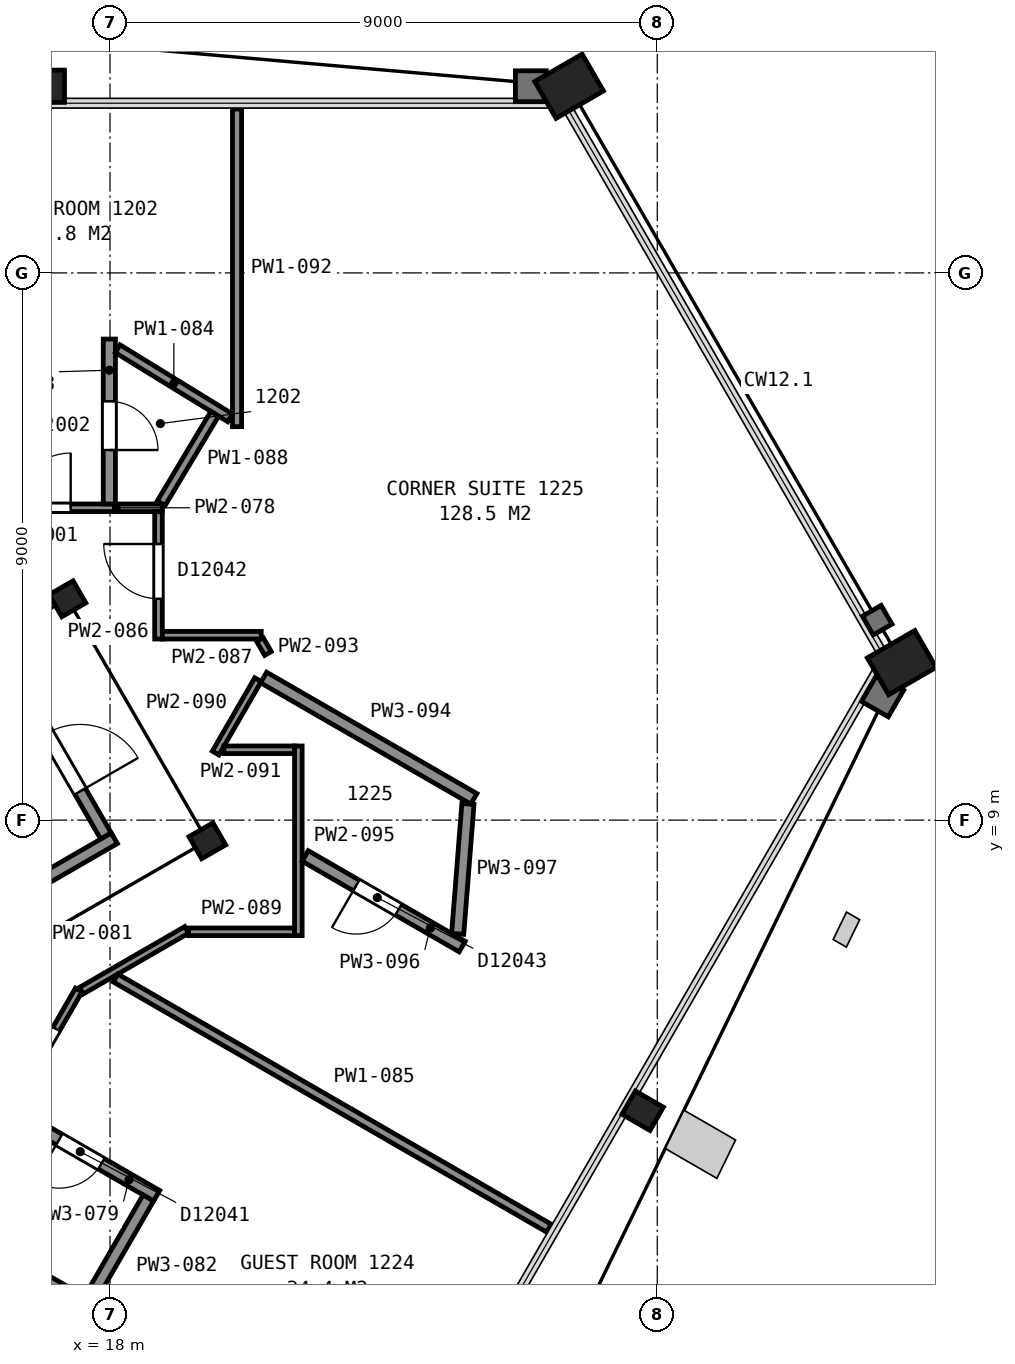
"""IFC4 building model, lengths in metres.
Left out: names, types, materials, properties, quantities, classifications, styles, units other than length and angle.
Written with IfcOpenShell. Run it as: python <this file> out.ifc"""

import sys

from ifc_helpers import new_model, si_unit, direction, frame, frame_2d, origin, origin_2d, place, context, subcontext, project, spatial, rectangle, hollow_rectangle, i_section, extrude, element, fill, save


model = new_model("IFC4")
c1 = context("Model", 3, precision=1e-05, world=origin(), true_north=direction((0.0, 1.0)))
c2 = subcontext(c1, "Body", "Model", "MODEL_VIEW")
j1 = project(units=[si_unit("LENGTHUNIT", "METRE"), si_unit("PLANEANGLEUNIT", "RADIAN")], contexts=[c1])
p1 = place(None, origin())
s1 = spatial("IfcSite", under=j1, at=p1, CompositionType="ELEMENT")
p2 = place(p1, origin())
s2 = spatial("IfcBuilding", under=s1, at=p2, CompositionType="ELEMENT")
p3 = place(p2, frame((0.0, 0.0, 58.4)))
s3 = spatial("IfcBuildingStorey", under=s2, at=p3, CompositionType="ELEMENT", Elevation=58.4)
p4 = place(p3, frame((25.55, 21.07, 0.0), z_axis=(0.0, 0.0, 1.0), x_axis=(0.5, -0.866025403784, 0.0)))
e1 = element("IfcColumn", 1, at=p4, inside=s3, PredefinedType="COLUMN", context=c2, shape_type="SweptSolid", body=[
    extrude(hollow_rectangle(XDim=0.7, YDim=0.9, WallThickness=0.065, at=origin_2d()), origin(), (0.0, 0.0, 1.0), 3.56),
])
for number, where, z_axis, x_axis in (
    (2, (17.03, 21.07, 0.0), (0.0, 0.0, 1.0), (1.0, 0.0, 0.0)),
    (3, (26.76, 4.22, 0.0), (0.0, 0.0, 1.0), (-0.5, -0.866, 0.0)),
):
    element("IfcColumn", number, at=place(p3, frame(where, z_axis=z_axis, x_axis=x_axis)), inside=s3, PredefinedType="COLUMN", context=c2, shape_type="SweptSolid", body=[
        extrude(i_section(OverallWidth=0.442, OverallDepth=0.531, WebThickness=0.066, FlangeThickness=0.106, FilletRadius=0.015, at=origin_2d()), origin(), (0.0, 0.0, 1.0), 3.575),
    ])
p5 = place(p3, frame((31.02, 11.59, 0.0), z_axis=(0.0, 0.0, 1.0), x_axis=(0.5, -0.866025403784, 0.0)))
e4 = element("IfcColumn", 4, at=p5, inside=s3, PredefinedType="COLUMN", context=c2, shape_type="SweptSolid", body=[
    extrude(hollow_rectangle(XDim=0.7, YDim=0.9, WallThickness=0.065, at=origin_2d()), origin(), (0.0, 0.0, 1.0), 3.56),
])
for number, where, z_axis, x_axis in (
    (5, (19.6, 8.66, 0.0), (0.0, 0.0, 1.0), (0.5, -0.866, 0.0)),
    (6, (17.3, 12.64, 0.0), (0.0, 0.0, 1.0), (0.5, -0.866, 0.0)),
):
    element("IfcColumn", number, at=place(p3, frame(where, z_axis=z_axis, x_axis=x_axis)), inside=s3, PredefinedType="COLUMN", context=c2, shape_type="SweptSolid", body=[
        extrude(i_section(OverallWidth=0.419, OverallDepth=0.455, WebThickness=0.042, FlangeThickness=0.068, FilletRadius=0.015, at=origin_2d()), origin(), (0.0, 0.0, 1.0), 3.6),
    ])
p6 = place(p3, frame((17.934, 8.738, 0.0), z_axis=(0.0, 0.0, 1.0), x_axis=(-0.49998411664, 0.866034573852, 0.0)))
e7 = element("IfcWall", 7, at=p6, inside=s3, PredefinedType="PARTITIONING", context=c2, shape_type="SweptSolid", body=[
    extrude(rectangle(XDim=2.8, YDim=0.2, at=frame_2d((1.4, 0.0))), origin(), (0.0, 0.0, 1.0), 3.35),
])
p7 = place(p6, frame((0.85, 0.0, 0.0)))
e8 = element("IfcOpeningElement", 8, at=p7, cuts=e7, PredefinedType="OPENING", context=c2, shape_type="SweptSolid", body=[
    extrude(rectangle(XDim=1.1, YDim=2.1, at=frame_2d((0.55, 1.05))), frame((0.0, 0.11, 0.0), z_axis=(0.0, -1.0, 0.0), x_axis=(1.0, 0.0, 0.0)), (0.0, 0.0, 1.0), 0.22),
])
p8 = place(p3, frame((7.678, 2.701, 0.0), z_axis=(0.0, 0.0, 1.0), x_axis=(0.866026010844, 0.49999894854, 0.0)))
e9 = element("IfcWall", 9, at=p8, inside=s3, PredefinedType="PARTITIONING", context=c2, shape_type="SweptSolid", body=[
    extrude(rectangle(XDim=12.0, YDim=0.2, at=frame_2d((6.0, 0.0))), origin(), (0.0, 0.0, 1.0), 3.35),
])
p9 = place(p3, frame((17.486, 6.206, 0.0), z_axis=(0.0, 0.0, 1.0), x_axis=(-0.499990458811, -0.866030912322, 0.0)))
e10 = element("IfcWall", 10, at=p9, inside=s3, PredefinedType="PARTITIONING", context=c2, shape_type="SweptSolid", body=[
    extrude(rectangle(XDim=27.441, YDim=0.125, at=frame_2d((13.721, 0.0))), origin(), (0.0, 0.0, 1.0), 2.613),
])
p10 = place(p9, frame((20.529, 0.0, 0.0)))
e11 = element("IfcOpeningElement", 11, at=p10, cuts=e10, PredefinedType="OPENING", context=c2, shape_type="SweptSolid", body=[
    extrude(rectangle(XDim=0.9, YDim=2.1, at=frame_2d((0.45, 1.05))), frame((0.0, 0.073, 0.0), z_axis=(0.0, -1.0, 0.0), x_axis=(1.0, 0.0, 0.0)), (0.0, 0.0, 1.0), 0.145),
])
p11 = place(p9, frame((17.516, 0.0, 0.0)))
e12 = element("IfcOpeningElement", 12, at=p11, cuts=e10, PredefinedType="OPENING", context=c2, shape_type="SweptSolid", body=[
    extrude(rectangle(XDim=0.9, YDim=2.1, at=frame_2d((0.45, 1.05))), frame((0.0, 0.073, 0.0), z_axis=(0.0, -1.0, 0.0), x_axis=(1.0, 0.0, 0.0)), (0.0, 0.0, 1.0), 0.145),
])
p12 = place(p9, frame((10.168, 0.0, 0.0)))
e13 = element("IfcOpeningElement", 13, at=p12, cuts=e10, PredefinedType="OPENING", context=c2, shape_type="SweptSolid", body=[
    extrude(rectangle(XDim=0.9, YDim=2.1, at=frame_2d((0.45, 1.05))), frame((0.0, 0.073, 0.0), z_axis=(0.0, -1.0, 0.0), x_axis=(1.0, 0.0, 0.0)), (0.0, 0.0, 1.0), 0.145),
])
p13 = place(p9, frame((7.403, 0.0, 0.0)))
e14 = element("IfcOpeningElement", 14, at=p13, cuts=e10, PredefinedType="OPENING", context=c2, shape_type="SweptSolid", body=[
    extrude(rectangle(XDim=0.9, YDim=2.1, at=frame_2d((0.45, 1.05))), frame((0.0, 0.073, 0.0), z_axis=(0.0, -1.0, 0.0), x_axis=(1.0, 0.0, 0.0)), (0.0, 0.0, 1.0), 0.145),
])
p14 = place(p9, frame((0.741, 0.0, 0.0)))
e15 = element("IfcOpeningElement", 15, at=p14, cuts=e10, PredefinedType="OPENING", context=c2, shape_type="SweptSolid", body=[
    extrude(rectangle(XDim=0.9, YDim=2.1, at=frame_2d((0.45, 1.05))), frame((0.0, 0.073, 0.0), z_axis=(0.0, -1.0, 0.0), x_axis=(1.0, 0.0, 0.0)), (0.0, 0.0, 1.0), 0.145),
])
p15 = place(p3, frame((15.349, 2.37, 0.0), z_axis=(0.0, 0.0, 1.0), x_axis=(0.866033609522, -0.499985786976, 0.0)))
e16 = element("IfcWall", 16, at=p15, inside=s3, PredefinedType="PARTITIONING", context=c2, shape_type="SweptSolid", body=[
    extrude(rectangle(XDim=8.587, YDim=0.15, at=frame_2d((4.293, 0.0))), origin(), (0.0, 0.0, 1.0), 2.613),
])
p16 = place(p3, frame((15.74, 14.137, 0.0), z_axis=(0.0, 0.0, 1.0), x_axis=(1.0, 0.0, 0.0)))
e17 = element("IfcWall", 17, at=p16, inside=s3, PredefinedType="PARTITIONING", context=c2, shape_type="SweptSolid", body=[
    extrude(rectangle(XDim=3.119, YDim=0.125, at=frame_2d((1.56, 0.0))), origin(), (0.0, 0.0, 1.0), 2.613),
])
p17 = place(p16, frame((0.712, 0.0, 0.0)))
e18 = element("IfcOpeningElement", 18, at=p17, cuts=e17, PredefinedType="OPENING", context=c2, shape_type="SweptSolid", body=[
    extrude(rectangle(XDim=0.9, YDim=2.1, at=frame_2d((0.45, 1.05))), frame((0.0, 0.073, 0.0), z_axis=(0.0, -1.0, 0.0), x_axis=(1.0, 0.0, 0.0)), (0.0, 0.0, 1.0), 0.145),
])
p18 = place(p3, frame((18.767, 2.822, 0.0), z_axis=(0.0, 0.0, 1.0), x_axis=(-0.866117296485, 0.499840803386, 0.0)))
e19 = element("IfcWall", 19, at=p18, inside=s3, PredefinedType="PARTITIONING", context=c2, shape_type="SweptSolid", body=[
    extrude(rectangle(XDim=2.738, YDim=0.2, at=frame_2d((1.369, 0.0))), origin(), (0.0, 0.0, 1.0), 2.613),
])
p19 = place(p18, frame((1.051, 0.0, 0.0)))
e20 = element("IfcOpeningElement", 20, at=p19, cuts=e19, PredefinedType="OPENING", context=c2, shape_type="SweptSolid", body=[
    extrude(rectangle(XDim=0.8, YDim=2.1, at=frame_2d((0.4, 1.05))), frame((0.0, 0.11, 0.0), z_axis=(0.0, -1.0, 0.0), x_axis=(1.0, 0.0, 0.0)), (0.0, 0.0, 1.0), 0.22),
])
p20 = place(p3, frame((17.529, 6.195, 0.0), z_axis=(0.0, 0.0, 1.0), x_axis=(0.866002566612, 0.500039553057, 0.0)))
e21 = element("IfcWall", 21, at=p20, inside=s3, PredefinedType="PARTITIONING", context=c2, shape_type="SweptSolid", body=[
    extrude(rectangle(XDim=1.999, YDim=0.125, at=frame_2d((1.0, 0.0))), origin(), (0.0, 0.0, 1.0), 2.613),
])
p21 = place(p3, frame((17.669, 1.123, 0.0), z_axis=(0.0, 0.0, 1.0), x_axis=(0.500269123289, 0.865869969617, 0.0)))
e22 = element("IfcWall", 22, at=p21, inside=s3, PredefinedType="PARTITIONING", context=c2, shape_type="SweptSolid", body=[
    extrude(rectangle(XDim=1.92, YDim=0.2, at=frame_2d((0.96, 0.0))), origin(), (0.0, 0.0, 1.0), 2.613),
])
p22 = place(p3, frame((17.989, 16.912, 0.0), z_axis=(0.0, 0.0, 1.0), x_axis=(0.0, -1.0, 0.0)))
e23 = element("IfcWall", 23, at=p22, inside=s3, PredefinedType="PARTITIONING", context=c2, shape_type="SweptSolid", body=[
    extrude(rectangle(XDim=2.713, YDim=0.2, at=frame_2d((1.356, 0.0))), origin(), (0.0, 0.0, 1.0), 2.613),
])
p23 = place(p22, frame((1.025, 0.0, 0.0)))
e24 = element("IfcOpeningElement", 24, at=p23, cuts=e23, PredefinedType="OPENING", context=c2, shape_type="SweptSolid", body=[
    extrude(rectangle(XDim=0.8, YDim=2.1, at=frame_2d((0.4, 1.05))), frame((0.0, 0.11, 0.0), z_axis=(0.0, -1.0, 0.0), x_axis=(1.0, 0.0, 0.0)), (0.0, 0.0, 1.0), 0.22),
])
p24 = place(p3, frame((18.125, 16.753, 0.0), z_axis=(0.0, 0.0, 1.0), x_axis=(0.851893865078, -0.523714466711, 0.0)))
e25 = element("IfcWall", 25, at=p24, inside=s3, PredefinedType="PARTITIONING", context=c2, shape_type="SweptSolid", body=[
    extrude(rectangle(XDim=2.17, YDim=0.15, at=frame_2d((1.085, 0.0))), origin(), (0.0, 0.0, 1.0), 2.613),
])
p25 = place(p3, frame((18.091, 6.403, 0.0), z_axis=(0.0, 0.0, 1.0), x_axis=(0.866038366034, -0.499977548053, 0.0)))
e26 = element("IfcWall", 26, at=p25, inside=s3, PredefinedType="PARTITIONING", context=c2, shape_type="SweptSolid", body=[
    extrude(rectangle(XDim=8.229, YDim=0.15, at=frame_2d((4.115, 0.0))), origin(), (0.0, 0.0, 1.0), 2.613),
])
p26 = place(p3, frame((18.797, 14.072, 0.0), z_axis=(0.0, 0.0, 1.0), x_axis=(0.0, -1.0, 0.0)))
e27 = element("IfcWall", 27, at=p26, inside=s3, PredefinedType="PARTITIONING", context=c2, shape_type="SweptSolid", body=[
    extrude(rectangle(XDim=2.094, YDim=0.125, at=frame_2d((1.047, 0.0))), origin(), (0.0, 0.0, 1.0), 2.613),
])
p27 = place(p26, frame((0.531, 0.0, 0.0)))
e28 = element("IfcOpeningElement", 28, at=p27, cuts=e27, PredefinedType="OPENING", context=c2, shape_type="SweptSolid", body=[
    extrude(rectangle(XDim=0.9, YDim=2.1, at=frame_2d((0.45, 1.05))), frame((0.0, 0.073, 0.0), z_axis=(0.0, -1.0, 0.0), x_axis=(1.0, 0.0, 0.0)), (0.0, 0.0, 1.0), 0.145),
])
p28 = place(p3, frame((18.862, 12.041, 0.0), z_axis=(0.0, 0.0, 1.0), x_axis=(1.0, 0.0, 0.0)))
e29 = element("IfcWall", 29, at=p28, inside=s3, PredefinedType="PARTITIONING", context=c2, shape_type="SweptSolid", body=[
    extrude(rectangle(XDim=1.625, YDim=0.125, at=frame_2d((0.812, 0.0))), origin(), (0.0, 0.0, 1.0), 2.613),
])
p29 = place(p3, frame((18.842, 14.212, 0.0), z_axis=(0.0, 0.0, 1.0), x_axis=(0.513405982386, 0.858145848472, 0.0)))
e30 = element("IfcWall", 30, at=p29, inside=s3, PredefinedType="PARTITIONING", context=c2, shape_type="SweptSolid", body=[
    extrude(rectangle(XDim=1.714, YDim=0.15, at=frame_2d((0.857, 0.0))), origin(), (0.0, 0.0, 1.0), 2.613),
])
p30 = place(p3, frame((19.291, 7.163, 0.0), z_axis=(0.0, 0.0, 1.0), x_axis=(1.0, 0.0, 0.0)))
e31 = element("IfcWall", 31, at=p30, inside=s3, PredefinedType="PARTITIONING", context=c2, shape_type="SweptSolid", body=[
    extrude(rectangle(XDim=1.741, YDim=0.125, at=frame_2d((0.871, 0.0))), origin(), (0.0, 0.0, 1.0), 2.613),
])
p31 = place(p3, frame((19.737, 10.103, 0.0), z_axis=(0.0, 0.0, 1.0), x_axis=(0.499944854726, 0.866057239582, 0.0)))
e32 = element("IfcWall", 32, at=p31, inside=s3, PredefinedType="PARTITIONING", context=c2, shape_type="SweptSolid", body=[
    extrude(rectangle(XDim=1.394, YDim=0.125, at=frame_2d((0.697, 0.0))), origin(), (0.0, 0.0, 1.0), 2.613),
])
p32 = place(p3, frame((19.873, 10.157, 0.0), z_axis=(0.0, 0.0, 1.0), x_axis=(1.0, 0.0, 0.0)))
e33 = element("IfcWall", 33, at=p32, inside=s3, PredefinedType="PARTITIONING", context=c2, shape_type="SweptSolid", body=[
    extrude(rectangle(XDim=1.159, YDim=0.125, at=frame_2d((0.58, 0.0))), origin(), (0.0, 0.0, 1.0), 2.613),
])
p33 = place(p3, frame((20.089, 15.471, 0.0), z_axis=(0.0, 0.0, 1.0), x_axis=(0.0, 1.0, 0.0)))
e34 = element("IfcWall", 34, at=p33, inside=s3, PredefinedType="PARTITIONING", context=c2, shape_type="SweptSolid", body=[
    extrude(rectangle(XDim=5.224, YDim=0.15, at=frame_2d((2.612, 0.0))), origin(), (0.0, 0.0, 1.0), 2.613),
])
p34 = place(p3, frame((20.467, 11.967, 0.0), z_axis=(0.0, 0.0, 1.0), x_axis=(0.500153222552, -0.865936922628, 0.0)))
e35 = element("IfcWall", 35, at=p34, inside=s3, PredefinedType="PARTITIONING", context=c2, shape_type="SweptSolid", body=[
    extrude(rectangle(XDim=0.262, YDim=0.125, at=frame_2d((0.131, 0.0))), origin(), (0.0, 0.0, 1.0), 2.613),
])
p35 = place(p3, frame((20.526, 11.346, 0.0), z_axis=(0.0, 0.0, 1.0), x_axis=(0.866089865591, -0.499888332251, 0.0)))
e36 = element("IfcWall", 36, at=p35, inside=s3, PredefinedType="PARTITIONING", context=c2, shape_type="SweptSolid", body=[
    extrude(rectangle(XDim=3.992, YDim=0.2, at=frame_2d((1.996, 0.0))), origin(), (0.0, 0.0, 1.0), 2.613),
])
p36 = place(p3, frame((21.097, 7.101, 0.0), z_axis=(0.0, 0.0, 1.0), x_axis=(0.0, 1.0, 0.0)))
e37 = element("IfcWall", 37, at=p36, inside=s3, PredefinedType="PARTITIONING", context=c2, shape_type="SweptSolid", body=[
    extrude(rectangle(XDim=3.119, YDim=0.125, at=frame_2d((1.56, 0.0))), origin(), (0.0, 0.0, 1.0), 2.613),
])
p37 = place(p3, frame((21.209, 8.411, 0.0), z_axis=(0.0, 0.0, 1.0), x_axis=(0.86595648724, -0.500119347963, 0.0)))
e38 = element("IfcWall", 38, at=p37, inside=s3, PredefinedType="PARTITIONING", context=c2, shape_type="SweptSolid", body=[
    extrude(rectangle(XDim=2.982, YDim=0.2, at=frame_2d((1.491, 0.0))), origin(), (0.0, 0.0, 1.0), 2.613),
])
p38 = place(p37, frame((0.97, 0.0, 0.0)))
e39 = element("IfcOpeningElement", 39, at=p38, cuts=e38, PredefinedType="OPENING", context=c2, shape_type="SweptSolid", body=[
    extrude(rectangle(XDim=0.8, YDim=2.1, at=frame_2d((0.4, 1.05))), frame((0.0, 0.11, 0.0), z_axis=(0.0, -1.0, 0.0), x_axis=(1.0, 0.0, 0.0)), (0.0, 0.0, 1.0), 0.22),
])
p39 = place(p3, frame((23.718, 7.129, 0.0), z_axis=(0.0, 0.0, 1.0), x_axis=(0.078848500899, 0.996886610355, 0.0)))
e40 = element("IfcWall", 40, at=p39, inside=s3, PredefinedType="PARTITIONING", context=c2, shape_type="SweptSolid", body=[
    extrude(rectangle(XDim=2.143, YDim=0.2, at=frame_2d((1.071, 0.0))), origin(), (0.0, 0.0, 1.0), 2.613),
])
p40 = place(p7, origin())
e41 = element("IfcDoor", 41, at=p40, inside=s3, OperationType="SINGLE_SWING_LEFT", PredefinedType="DOOR", context=c2, shape_type="SweptSolid", body=[
    extrude(rectangle(XDim=1.1, YDim=2.1, at=frame_2d((0.55, 1.05))), frame((0.0, 0.025, 0.0), z_axis=(0.0, -1.0, 0.0), x_axis=(1.0, 0.0, 0.0)), (0.0, 0.0, 1.0), 0.05),
])
fill(e8, e41)
p41 = place(p14, origin())
e42 = element("IfcDoor", 42, at=p41, inside=s3, OperationType="SINGLE_SWING_LEFT", PredefinedType="DOOR", context=c2, shape_type="SweptSolid", body=[
    extrude(rectangle(XDim=0.9, YDim=2.1, at=frame_2d((0.45, 1.05))), frame((0.0, 0.025, 0.0), z_axis=(0.0, -1.0, 0.0), x_axis=(1.0, 0.0, 0.0)), (0.0, 0.0, 1.0), 0.05),
])
fill(e15, e42)
p42 = place(p17, origin())
e43 = element("IfcDoor", 43, at=p42, inside=s3, OperationType="SINGLE_SWING_RIGHT", PredefinedType="DOOR", context=c2, shape_type="SweptSolid", body=[
    extrude(rectangle(XDim=0.9, YDim=2.1, at=frame_2d((0.45, 1.05))), frame((0.0, 0.025, 0.0), z_axis=(0.0, -1.0, 0.0), x_axis=(1.0, 0.0, 0.0)), (0.0, 0.0, 1.0), 0.05),
])
fill(e18, e43)
p43 = place(p19, origin())
e44 = element("IfcDoor", 44, at=p43, inside=s3, OperationType="SINGLE_SWING_RIGHT", PredefinedType="DOOR", context=c2, shape_type="SweptSolid", body=[
    extrude(rectangle(XDim=0.8, YDim=2.1, at=frame_2d((0.4, 1.05))), frame((0.0, 0.025, 0.0), z_axis=(0.0, -1.0, 0.0), x_axis=(1.0, 0.0, 0.0)), (0.0, 0.0, 1.0), 0.05),
])
fill(e20, e44)
p44 = place(p23, origin())
e45 = element("IfcDoor", 45, at=p44, inside=s3, OperationType="SINGLE_SWING_RIGHT", PredefinedType="DOOR", context=c2, shape_type="SweptSolid", body=[
    extrude(rectangle(XDim=0.8, YDim=2.1, at=frame_2d((0.4, 1.05))), frame((0.0, 0.025, 0.0), z_axis=(0.0, -1.0, 0.0), x_axis=(1.0, 0.0, 0.0)), (0.0, 0.0, 1.0), 0.05),
])
fill(e24, e45)
p45 = place(p27, origin())
e46 = element("IfcDoor", 46, at=p45, inside=s3, OperationType="SINGLE_SWING_LEFT", PredefinedType="DOOR", context=c2, shape_type="SweptSolid", body=[
    extrude(rectangle(XDim=0.9, YDim=2.1, at=frame_2d((0.45, 1.05))), frame((0.0, 0.025, 0.0), z_axis=(0.0, -1.0, 0.0), x_axis=(1.0, 0.0, 0.0)), (0.0, 0.0, 1.0), 0.05),
])
fill(e28, e46)
p46 = place(p38, origin())
e47 = element("IfcDoor", 47, at=p46, inside=s3, OperationType="SINGLE_SWING_LEFT", PredefinedType="DOOR", context=c2, shape_type="SweptSolid", body=[
    extrude(rectangle(XDim=0.8, YDim=2.1, at=frame_2d((0.4, 1.05))), frame((0.0, 0.025, 0.0), z_axis=(0.0, -1.0, 0.0), x_axis=(1.0, 0.0, 0.0)), (0.0, 0.0, 1.0), 0.05),
])
fill(e39, e47)
save(model, sys.argv[1])
